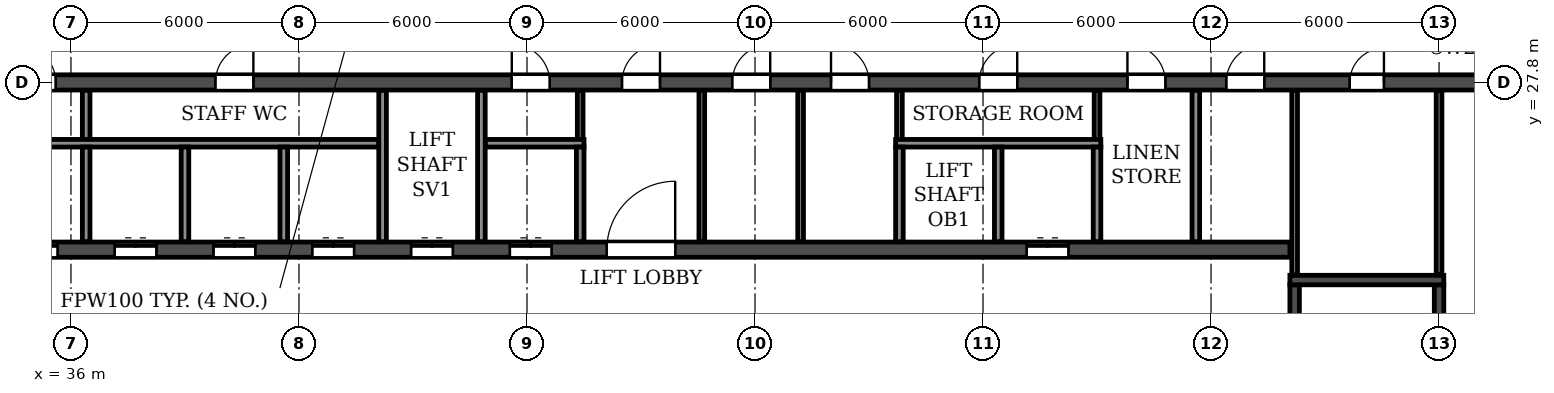
"""IFC4 building model, lengths in metres.
Left out: names, types, materials, properties, quantities, classifications, styles, units other than length and angle.
Written with IfcOpenShell. Run it as: python <this file> out.ifc"""

import sys

from ifc_helpers import new_model, si_unit, direction, frame, frame_2d, origin, place, context, subcontext, project, spatial, rectangle, extrude, element, fill, save


model = new_model("IFC4")
c1 = context("Model", 3, precision=1e-05, world=origin(), true_north=direction((0.0, 1.0)))
c2 = subcontext(c1, "Body", "Model", "MODEL_VIEW")
j1 = project(units=[si_unit("LENGTHUNIT", "METRE"), si_unit("PLANEANGLEUNIT", "RADIAN")], contexts=[c1])
p1 = place(None, origin())
s1 = spatial("IfcSite", under=j1, at=p1, CompositionType="ELEMENT")
p2 = place(p1, origin())
s2 = spatial("IfcBuilding", under=s1, at=p2, CompositionType="ELEMENT")
p3 = place(p2, frame((0.0, 0.0, 191.7)))
s3 = spatial("IfcBuildingStorey", under=s2, at=p3, CompositionType="ELEMENT", Elevation=191.7)
p4 = place(p3, frame((18.2, 27.8, 0.0), z_axis=(0.0, 0.0, 1.0), x_axis=(1.0, 0.0, 0.0)))
e1 = element("IfcWall", 1, at=p4, inside=s3, PredefinedType="SOLIDWALL", context=c2, shape_type="SweptSolid", body=[
    extrude(rectangle(XDim=65.6, YDim=0.4, at=frame_2d((32.8, 0.0))), origin(), (0.0, 0.0, 1.0), 3.08),
])
p5 = place(p4, frame((0.7, 0.0, 0.0)))
e2 = element("IfcOpeningElement", 2, at=p5, cuts=e1, PredefinedType="OPENING", context=c2, shape_type="SweptSolid", body=[
    extrude(rectangle(XDim=1.0, YDim=2.1, at=frame_2d((0.5, 1.05))), frame((0.0, 0.21, 0.0), z_axis=(0.0, -1.0, 0.0), x_axis=(1.0, 0.0, 0.0)), (0.0, 0.0, 1.0), 0.42),
])
p6 = place(p4, frame((4.05, 0.0, 0.0)))
e3 = element("IfcOpeningElement", 3, at=p6, cuts=e1, PredefinedType="OPENING", context=c2, shape_type="SweptSolid", body=[
    extrude(rectangle(XDim=0.9, YDim=2.1, at=frame_2d((0.45, 1.05))), frame((0.0, 0.21, 0.0), z_axis=(0.0, -1.0, 0.0), x_axis=(1.0, 0.0, 0.0)), (0.0, 0.0, 1.0), 0.42),
])
p7 = place(p4, frame((13.25, 0.0, 0.0)))
e4 = element("IfcOpeningElement", 4, at=p7, cuts=e1, PredefinedType="OPENING", context=c2, shape_type="SweptSolid", body=[
    extrude(rectangle(XDim=0.9, YDim=2.1, at=frame_2d((0.45, 1.05))), frame((0.0, 0.21, 0.0), z_axis=(0.0, -1.0, 0.0), x_axis=(1.0, 0.0, 0.0)), (0.0, 0.0, 1.0), 0.42),
])
p8 = place(p4, frame((16.4, 0.0, 0.0)))
e5 = element("IfcOpeningElement", 5, at=p8, cuts=e1, PredefinedType="OPENING", context=c2, shape_type="SweptSolid", body=[
    extrude(rectangle(XDim=1.0, YDim=2.1, at=frame_2d((0.5, 1.05))), frame((0.0, 0.21, 0.0), z_axis=(0.0, -1.0, 0.0), x_axis=(1.0, 0.0, 0.0)), (0.0, 0.0, 1.0), 0.42),
])
p9 = place(p4, frame((21.6, 0.0, 0.0)))
e6 = element("IfcOpeningElement", 6, at=p9, cuts=e1, PredefinedType="OPENING", context=c2, shape_type="SweptSolid", body=[
    extrude(rectangle(XDim=1.0, YDim=2.1, at=frame_2d((0.5, 1.05))), frame((0.0, 0.21, 0.0), z_axis=(0.0, -1.0, 0.0), x_axis=(1.0, 0.0, 0.0)), (0.0, 0.0, 1.0), 0.42),
])
p10 = place(p4, frame((29.4, 0.0, 0.0)))
e7 = element("IfcOpeningElement", 7, at=p10, cuts=e1, PredefinedType="OPENING", context=c2, shape_type="SweptSolid", body=[
    extrude(rectangle(XDim=1.0, YDim=2.1, at=frame_2d((0.5, 1.05))), frame((0.0, 0.21, 0.0), z_axis=(0.0, -1.0, 0.0), x_axis=(1.0, 0.0, 0.0)), (0.0, 0.0, 1.0), 0.42),
])
p11 = place(p4, frame((32.3, 0.0, 0.0)))
e8 = element("IfcOpeningElement", 8, at=p11, cuts=e1, PredefinedType="OPENING", context=c2, shape_type="SweptSolid", body=[
    extrude(rectangle(XDim=1.0, YDim=2.1, at=frame_2d((0.5, 1.05))), frame((0.0, 0.21, 0.0), z_axis=(0.0, -1.0, 0.0), x_axis=(1.0, 0.0, 0.0)), (0.0, 0.0, 1.0), 0.42),
])
p12 = place(p4, frame((35.2, 0.0, 0.0)))
e9 = element("IfcOpeningElement", 9, at=p12, cuts=e1, PredefinedType="OPENING", context=c2, shape_type="SweptSolid", body=[
    extrude(rectangle(XDim=1.0, YDim=2.1, at=frame_2d((0.5, 1.05))), frame((0.0, 0.21, 0.0), z_axis=(0.0, -1.0, 0.0), x_axis=(1.0, 0.0, 0.0)), (0.0, 0.0, 1.0), 0.42),
])
p13 = place(p4, frame((37.8, 0.0, 0.0)))
e10 = element("IfcOpeningElement", 10, at=p13, cuts=e1, PredefinedType="OPENING", context=c2, shape_type="SweptSolid", body=[
    extrude(rectangle(XDim=1.0, YDim=2.1, at=frame_2d((0.5, 1.05))), frame((0.0, 0.21, 0.0), z_axis=(0.0, -1.0, 0.0), x_axis=(1.0, 0.0, 0.0)), (0.0, 0.0, 1.0), 0.42),
])
p14 = place(p4, frame((41.7, 0.0, 0.0)))
e11 = element("IfcOpeningElement", 11, at=p14, cuts=e1, PredefinedType="OPENING", context=c2, shape_type="SweptSolid", body=[
    extrude(rectangle(XDim=1.0, YDim=2.1, at=frame_2d((0.5, 1.05))), frame((0.0, 0.21, 0.0), z_axis=(0.0, -1.0, 0.0), x_axis=(1.0, 0.0, 0.0)), (0.0, 0.0, 1.0), 0.42),
])
p15 = place(p4, frame((45.6, 0.0, 0.0)))
e12 = element("IfcOpeningElement", 12, at=p15, cuts=e1, PredefinedType="OPENING", context=c2, shape_type="SweptSolid", body=[
    extrude(rectangle(XDim=1.0, YDim=2.1, at=frame_2d((0.5, 1.05))), frame((0.0, 0.21, 0.0), z_axis=(0.0, -1.0, 0.0), x_axis=(1.0, 0.0, 0.0)), (0.0, 0.0, 1.0), 0.42),
])
p16 = place(p4, frame((48.2, 0.0, 0.0)))
e13 = element("IfcOpeningElement", 13, at=p16, cuts=e1, PredefinedType="OPENING", context=c2, shape_type="SweptSolid", body=[
    extrude(rectangle(XDim=1.0, YDim=2.1, at=frame_2d((0.5, 1.05))), frame((0.0, 0.21, 0.0), z_axis=(0.0, -1.0, 0.0), x_axis=(1.0, 0.0, 0.0)), (0.0, 0.0, 1.0), 0.42),
])
p17 = place(p4, frame((51.45, 0.0, 0.0)))
e14 = element("IfcOpeningElement", 14, at=p17, cuts=e1, PredefinedType="OPENING", context=c2, shape_type="SweptSolid", body=[
    extrude(rectangle(XDim=0.9, YDim=2.1, at=frame_2d((0.45, 1.05))), frame((0.0, 0.21, 0.0), z_axis=(0.0, -1.0, 0.0), x_axis=(1.0, 0.0, 0.0)), (0.0, 0.0, 1.0), 0.42),
])
p18 = place(p4, frame((60.65, 0.0, 0.0)))
e15 = element("IfcOpeningElement", 15, at=p18, cuts=e1, PredefinedType="OPENING", context=c2, shape_type="SweptSolid", body=[
    extrude(rectangle(XDim=0.9, YDim=2.1, at=frame_2d((0.45, 1.05))), frame((0.0, 0.21, 0.0), z_axis=(0.0, -1.0, 0.0), x_axis=(1.0, 0.0, 0.0)), (0.0, 0.0, 1.0), 0.42),
])
p19 = place(p4, frame((63.9, 0.0, 0.0)))
e16 = element("IfcOpeningElement", 16, at=p19, cuts=e1, PredefinedType="OPENING", context=c2, shape_type="SweptSolid", body=[
    extrude(rectangle(XDim=1.0, YDim=2.1, at=frame_2d((0.5, 1.05))), frame((0.0, 0.21, 0.0), z_axis=(0.0, -1.0, 0.0), x_axis=(1.0, 0.0, 0.0)), (0.0, 0.0, 1.0), 0.42),
])
p20 = place(p3, frame((33.925, 23.4, 0.0), z_axis=(0.0, 0.0, 1.0), x_axis=(1.0, 0.0, 0.0)))
e17 = element("IfcWall", 17, at=p20, inside=s3, PredefinedType="SOLIDWALL", context=c2, shape_type="SweptSolid", body=[
    extrude(rectangle(XDim=34.15, YDim=0.4, at=frame_2d((17.075, 0.0))), origin(), (0.0, 0.0, 1.0), 3.08),
])
p21 = place(p20, frame((16.175, 0.0, 0.0)))
e18 = element("IfcOpeningElement", 18, at=p21, cuts=e17, PredefinedType="OPENING", context=c2, shape_type="SweptSolid", body=[
    extrude(rectangle(XDim=1.8, YDim=2.1, at=frame_2d((0.9, 1.05))), frame((0.0, 0.21, 0.0), z_axis=(0.0, -1.0, 0.0), x_axis=(1.0, 0.0, 0.0)), (0.0, 0.0, 1.0), 0.42),
])
p22 = place(p20, frame((0.625, 0.0, 0.0)))
e19 = element("IfcOpeningElement", 19, at=p22, cuts=e17, PredefinedType="OPENING", context=c2, shape_type="SweptSolid", body=[
    extrude(rectangle(XDim=1.1, YDim=2.1, at=frame_2d((0.55, 1.05))), frame((0.0, 0.21, 0.0), z_axis=(0.0, -1.0, 0.0), x_axis=(1.0, 0.0, 0.0)), (0.0, 0.0, 1.0), 0.42),
])
p23 = place(p20, frame((3.225, 0.0, 0.0)))
e20 = element("IfcOpeningElement", 20, at=p23, cuts=e17, PredefinedType="OPENING", context=c2, shape_type="SweptSolid", body=[
    extrude(rectangle(XDim=1.1, YDim=2.1, at=frame_2d((0.55, 1.05))), frame((0.0, 0.21, 0.0), z_axis=(0.0, -1.0, 0.0), x_axis=(1.0, 0.0, 0.0)), (0.0, 0.0, 1.0), 0.42),
])
p24 = place(p20, frame((5.825, 0.0, 0.0)))
e21 = element("IfcOpeningElement", 21, at=p24, cuts=e17, PredefinedType="OPENING", context=c2, shape_type="SweptSolid", body=[
    extrude(rectangle(XDim=1.1, YDim=2.1, at=frame_2d((0.55, 1.05))), frame((0.0, 0.21, 0.0), z_axis=(0.0, -1.0, 0.0), x_axis=(1.0, 0.0, 0.0)), (0.0, 0.0, 1.0), 0.42),
])
p25 = place(p20, frame((8.425, 0.0, 0.0)))
e22 = element("IfcOpeningElement", 22, at=p25, cuts=e17, PredefinedType="OPENING", context=c2, shape_type="SweptSolid", body=[
    extrude(rectangle(XDim=1.1, YDim=2.1, at=frame_2d((0.55, 1.05))), frame((0.0, 0.21, 0.0), z_axis=(0.0, -1.0, 0.0), x_axis=(1.0, 0.0, 0.0)), (0.0, 0.0, 1.0), 0.42),
])
p26 = place(p20, frame((11.025, 0.0, 0.0)))
e23 = element("IfcOpeningElement", 23, at=p26, cuts=e17, PredefinedType="OPENING", context=c2, shape_type="SweptSolid", body=[
    extrude(rectangle(XDim=1.1, YDim=2.1, at=frame_2d((0.55, 1.05))), frame((0.0, 0.21, 0.0), z_axis=(0.0, -1.0, 0.0), x_axis=(1.0, 0.0, 0.0)), (0.0, 0.0, 1.0), 0.42),
])
p27 = place(p20, frame((13.625, 0.0, 0.0)))
e24 = element("IfcOpeningElement", 24, at=p27, cuts=e17, PredefinedType="OPENING", context=c2, shape_type="SweptSolid", body=[
    extrude(rectangle(XDim=1.1, YDim=2.1, at=frame_2d((0.55, 1.05))), frame((0.0, 0.21, 0.0), z_axis=(0.0, -1.0, 0.0), x_axis=(1.0, 0.0, 0.0)), (0.0, 0.0, 1.0), 0.42),
])
p28 = place(p20, frame((27.225, 0.0, 0.0)))
e25 = element("IfcOpeningElement", 25, at=p28, cuts=e17, PredefinedType="OPENING", context=c2, shape_type="SweptSolid", body=[
    extrude(rectangle(XDim=1.1, YDim=2.1, at=frame_2d((0.55, 1.05))), frame((0.0, 0.21, 0.0), z_axis=(0.0, -1.0, 0.0), x_axis=(1.0, 0.0, 0.0)), (0.0, 0.0, 1.0), 0.42),
])
p29 = place(p3, frame((68.2, 14.8, 0.0), z_axis=(0.0, 0.0, 1.0), x_axis=(0.0, 1.0, 0.0)))
e26 = element("IfcWall", 26, at=p29, inside=s3, PredefinedType="SOLIDWALL", context=c2, shape_type="SweptSolid", body=[
    extrude(rectangle(XDim=7.675, YDim=0.25, at=frame_2d((3.837, 0.0))), origin(), (0.0, 0.0, 1.0), 3.08),
])
p30 = place(p29, frame((0.5, 0.0, 0.0)))
e27 = element("IfcOpeningElement", 27, at=p30, cuts=e26, PredefinedType="OPENING", context=c2, shape_type="SweptSolid", body=[
    extrude(rectangle(XDim=1.0, YDim=2.1, at=frame_2d((0.5, 1.05))), frame((0.0, 0.135, 0.0), z_axis=(0.0, -1.0, 0.0), x_axis=(1.0, 0.0, 0.0)), (0.0, 0.0, 1.0), 0.27),
])
p31 = place(p3, frame((72.0, 14.8, 0.0), z_axis=(0.0, 0.0, 1.0), x_axis=(0.0, 1.0, 0.0)))
e28 = element("IfcWall", 28, at=p31, inside=s3, PredefinedType="SOLIDWALL", context=c2, shape_type="SweptSolid", body=[
    extrude(rectangle(XDim=7.675, YDim=0.25, at=frame_2d((3.837, 0.0))), origin(), (0.0, 0.0, 1.0), 3.08),
])
p32 = place(p3, frame((68.075, 22.6, 0.0), z_axis=(0.0, 0.0, 1.0), x_axis=(1.0, 0.0, 0.0)))
e29 = element("IfcWall", 29, at=p32, inside=s3, PredefinedType="SOLIDWALL", context=c2, shape_type="SweptSolid", body=[
    extrude(rectangle(XDim=4.05, YDim=0.25, at=frame_2d((2.025, 0.0))), origin(), (0.0, 0.0, 1.0), 3.08),
])
p33 = place(p3, frame((49.4, 26.3, 0.0), z_axis=(0.0, 0.0, 1.0), x_axis=(0.0, 1.0, 0.0)))
e30 = element("IfcWall", 30, at=p33, inside=s3, PredefinedType="PARTITIONING", context=c2, shape_type="SweptSolid", body=[
    extrude(rectangle(XDim=1.29, YDim=0.15, at=frame_2d((0.645, 0.0))), origin(), (0.0, 0.0, 1.0), 3.08),
])
for number, where, z_axis, x_axis in (
    (31, (52.6, 23.61, 0.0), (0.0, 0.0, 1.0), (0.0, 1.0, 0.0)),
    (32, (55.2, 23.61, 0.0), (0.0, 0.0, 1.0), (0.0, 1.0, 0.0)),
):
    element("IfcWall", number, at=place(p3, frame(where, z_axis=z_axis, x_axis=x_axis)), inside=s3, PredefinedType="PARTITIONING", context=c2, shape_type="SweptSolid", body=[
        extrude(rectangle(XDim=3.98, YDim=0.15, at=frame_2d((1.99, 0.0))), origin(), (0.0, 0.0, 1.0), 3.08),
    ])
for number, where, z_axis, x_axis in (
    (33, (57.8, 26.3, 0.0), (0.0, 0.0, 1.0), (0.0, 1.0, 0.0)),
    (34, (63.0, 26.3, 0.0), (0.0, 0.0, 1.0), (0.0, 1.0, 0.0)),
):
    element("IfcWall", number, at=place(p3, frame(where, z_axis=z_axis, x_axis=x_axis)), inside=s3, PredefinedType="PARTITIONING", context=c2, shape_type="SweptSolid", body=[
        extrude(rectangle(XDim=1.29, YDim=0.15, at=frame_2d((0.645, 0.0))), origin(), (0.0, 0.0, 1.0), 3.08),
    ])
p34 = place(p3, frame((36.4, 26.3, 0.0), z_axis=(0.0, 0.0, 1.0), x_axis=(0.0, 1.0, 0.0)))
e35 = element("IfcWall", 35, at=p34, inside=s3, PredefinedType="PARTITIONING", context=c2, shape_type="SweptSolid", body=[
    extrude(rectangle(XDim=1.29, YDim=0.2, at=frame_2d((0.645, 0.0))), origin(), (0.0, 0.0, 1.0), 3.08),
])
p35 = place(p3, frame((65.6, 23.61, 0.0), z_axis=(0.0, 0.0, 1.0), x_axis=(0.0, 1.0, 0.0)))
e36 = element("IfcWall", 36, at=p35, inside=s3, PredefinedType="PARTITIONING", context=c2, shape_type="SweptSolid", body=[
    extrude(rectangle(XDim=3.98, YDim=0.2, at=frame_2d((1.99, 0.0))), origin(), (0.0, 0.0, 1.0), 3.08),
])
for number, where, z_axis, x_axis in (
    (37, (68.2, 22.735, 0.0), (0.0, 0.0, 1.0), (0.0, 1.0, 0.0)),
    (38, (72.0, 22.735, 0.0), (0.0, 0.0, 1.0), (0.0, 1.0, 0.0)),
):
    element("IfcWall", number, at=place(p3, frame(where, z_axis=z_axis, x_axis=x_axis)), inside=s3, PredefinedType="PARTITIONING", context=c2, shape_type="SweptSolid", body=[
        extrude(rectangle(XDim=4.855, YDim=0.15, at=frame_2d((2.427, 0.0))), origin(), (0.0, 0.0, 1.0), 3.08),
    ])
p36 = place(p3, frame((33.7, 26.2, 0.0), z_axis=(0.0, 0.0, 1.0), x_axis=(1.0, 0.0, 0.0)))
e39 = element("IfcWall", 39, at=p36, inside=s3, PredefinedType="PARTITIONING", context=c2, shape_type="SweptSolid", body=[
    extrude(rectangle(XDim=10.4, YDim=0.2, at=frame_2d((5.2, 0.0))), origin(), (0.0, 0.0, 1.0), 3.08),
])
p37 = place(p3, frame((46.9, 26.2, 0.0), z_axis=(0.0, 0.0, 1.0), x_axis=(1.0, 0.0, 0.0)))
e40 = element("IfcWall", 40, at=p37, inside=s3, PredefinedType="PARTITIONING", context=c2, shape_type="SweptSolid", body=[
    extrude(rectangle(XDim=2.6, YDim=0.2, at=frame_2d((1.3, 0.0))), origin(), (0.0, 0.0, 1.0), 3.08),
])
p38 = place(p3, frame((57.7, 26.2, 0.0), z_axis=(0.0, 0.0, 1.0), x_axis=(1.0, 0.0, 0.0)))
e41 = element("IfcWall", 41, at=p38, inside=s3, PredefinedType="PARTITIONING", context=c2, shape_type="SweptSolid", body=[
    extrude(rectangle(XDim=5.4, YDim=0.2, at=frame_2d((2.7, 0.0))), origin(), (0.0, 0.0, 1.0), 3.08),
])
for number, where, z_axis, x_axis in (
    (42, (36.4, 23.61, 0.0), (0.0, 0.0, 1.0), (0.0, 1.0, 0.0)),
    (43, (39.0, 23.61, 0.0), (0.0, 0.0, 1.0), (0.0, 1.0, 0.0)),
    (44, (41.6, 23.61, 0.0), (0.0, 0.0, 1.0), (0.0, 1.0, 0.0)),
):
    element("IfcWall", number, at=place(p3, frame(where, z_axis=z_axis, x_axis=x_axis)), inside=s3, PredefinedType="PARTITIONING", context=c2, shape_type="SweptSolid", body=[
        extrude(rectangle(XDim=2.49, YDim=0.2, at=frame_2d((1.245, 0.0))), origin(), (0.0, 0.0, 1.0), 3.08),
    ])
for number, where, z_axis, x_axis in (
    (45, (44.2, 23.61, 0.0), (0.0, 0.0, 1.0), (0.0, 1.0, 0.0)),
    (46, (46.8, 23.61, 0.0), (0.0, 0.0, 1.0), (0.0, 1.0, 0.0)),
):
    element("IfcWall", number, at=place(p3, frame(where, z_axis=z_axis, x_axis=x_axis)), inside=s3, PredefinedType="PARTITIONING", context=c2, shape_type="SweptSolid", body=[
        extrude(rectangle(XDim=3.98, YDim=0.2, at=frame_2d((1.99, 0.0))), origin(), (0.0, 0.0, 1.0), 3.08),
    ])
for number, where, z_axis, x_axis in (
    (47, (49.4, 23.61, 0.0), (0.0, 0.0, 1.0), (0.0, 1.0, 0.0)),
    (48, (57.8, 23.61, 0.0), (0.0, 0.0, 1.0), (0.0, 1.0, 0.0)),
    (49, (60.4, 23.61, 0.0), (0.0, 0.0, 1.0), (0.0, 1.0, 0.0)),
    (50, (63.0, 23.61, 0.0), (0.0, 0.0, 1.0), (0.0, 1.0, 0.0)),
):
    element("IfcWall", number, at=place(p3, frame(where, z_axis=z_axis, x_axis=x_axis)), inside=s3, PredefinedType="PARTITIONING", context=c2, shape_type="SweptSolid", body=[
        extrude(rectangle(XDim=2.49, YDim=0.2, at=frame_2d((1.245, 0.0))), origin(), (0.0, 0.0, 1.0), 3.08),
    ])
p39 = place(p8, origin())
e51 = element("IfcDoor", 51, at=p39, inside=s3, OperationType="SINGLE_SWING_LEFT", PredefinedType="DOOR", context=c2, shape_type="SweptSolid", body=[
    extrude(rectangle(XDim=1.0, YDim=2.1, at=frame_2d((0.5, 1.05))), frame((0.0, 0.025, 0.0), z_axis=(0.0, -1.0, 0.0), x_axis=(1.0, 0.0, 0.0)), (0.0, 0.0, 1.0), 0.05),
])
fill(e5, e51)
p40 = place(p9, origin())
e52 = element("IfcDoor", 52, at=p40, inside=s3, OperationType="SINGLE_SWING_RIGHT", PredefinedType="DOOR", context=c2, shape_type="SweptSolid", body=[
    extrude(rectangle(XDim=1.0, YDim=2.1, at=frame_2d((0.5, 1.05))), frame((0.0, 0.025, 0.0), z_axis=(0.0, -1.0, 0.0), x_axis=(1.0, 0.0, 0.0)), (0.0, 0.0, 1.0), 0.05),
])
fill(e6, e52)
p41 = place(p10, origin())
e53 = element("IfcDoor", 53, at=p41, inside=s3, OperationType="SINGLE_SWING_LEFT", PredefinedType="DOOR", context=c2, shape_type="SweptSolid", body=[
    extrude(rectangle(XDim=1.0, YDim=2.1, at=frame_2d((0.5, 1.05))), frame((0.0, 0.025, 0.0), z_axis=(0.0, -1.0, 0.0), x_axis=(1.0, 0.0, 0.0)), (0.0, 0.0, 1.0), 0.05),
])
fill(e7, e53)
p42 = place(p11, origin())
e54 = element("IfcDoor", 54, at=p42, inside=s3, OperationType="SINGLE_SWING_RIGHT", PredefinedType="DOOR", context=c2, shape_type="SweptSolid", body=[
    extrude(rectangle(XDim=1.0, YDim=2.1, at=frame_2d((0.5, 1.05))), frame((0.0, 0.025, 0.0), z_axis=(0.0, -1.0, 0.0), x_axis=(1.0, 0.0, 0.0)), (0.0, 0.0, 1.0), 0.05),
])
fill(e8, e54)
p43 = place(p12, origin())
e55 = element("IfcDoor", 55, at=p43, inside=s3, OperationType="SINGLE_SWING_RIGHT", PredefinedType="DOOR", context=c2, shape_type="SweptSolid", body=[
    extrude(rectangle(XDim=1.0, YDim=2.1, at=frame_2d((0.5, 1.05))), frame((0.0, 0.025, 0.0), z_axis=(0.0, -1.0, 0.0), x_axis=(1.0, 0.0, 0.0)), (0.0, 0.0, 1.0), 0.05),
])
fill(e9, e55)
p44 = place(p13, origin())
e56 = element("IfcDoor", 56, at=p44, inside=s3, OperationType="SINGLE_SWING_LEFT", PredefinedType="DOOR", context=c2, shape_type="SweptSolid", body=[
    extrude(rectangle(XDim=1.0, YDim=2.1, at=frame_2d((0.5, 1.05))), frame((0.0, 0.025, 0.0), z_axis=(0.0, -1.0, 0.0), x_axis=(1.0, 0.0, 0.0)), (0.0, 0.0, 1.0), 0.05),
])
fill(e10, e56)
p45 = place(p14, origin())
e57 = element("IfcDoor", 57, at=p45, inside=s3, OperationType="SINGLE_SWING_RIGHT", PredefinedType="DOOR", context=c2, shape_type="SweptSolid", body=[
    extrude(rectangle(XDim=1.0, YDim=2.1, at=frame_2d((0.5, 1.05))), frame((0.0, 0.025, 0.0), z_axis=(0.0, -1.0, 0.0), x_axis=(1.0, 0.0, 0.0)), (0.0, 0.0, 1.0), 0.05),
])
fill(e11, e57)
p46 = place(p15, origin())
e58 = element("IfcDoor", 58, at=p46, inside=s3, OperationType="SINGLE_SWING_LEFT", PredefinedType="DOOR", context=c2, shape_type="SweptSolid", body=[
    extrude(rectangle(XDim=1.0, YDim=2.1, at=frame_2d((0.5, 1.05))), frame((0.0, 0.025, 0.0), z_axis=(0.0, -1.0, 0.0), x_axis=(1.0, 0.0, 0.0)), (0.0, 0.0, 1.0), 0.05),
])
fill(e12, e58)
p47 = place(p16, origin())
e59 = element("IfcDoor", 59, at=p47, inside=s3, OperationType="SINGLE_SWING_RIGHT", PredefinedType="DOOR", context=c2, shape_type="SweptSolid", body=[
    extrude(rectangle(XDim=1.0, YDim=2.1, at=frame_2d((0.5, 1.05))), frame((0.0, 0.025, 0.0), z_axis=(0.0, -1.0, 0.0), x_axis=(1.0, 0.0, 0.0)), (0.0, 0.0, 1.0), 0.05),
])
fill(e13, e59)
p48 = place(p17, origin())
e60 = element("IfcDoor", 60, at=p48, inside=s3, OperationType="SINGLE_SWING_RIGHT", PredefinedType="DOOR", context=c2, shape_type="SweptSolid", body=[
    extrude(rectangle(XDim=0.9, YDim=2.1, at=frame_2d((0.45, 1.05))), frame((0.0, 0.025, 0.0), z_axis=(0.0, -1.0, 0.0), x_axis=(1.0, 0.0, 0.0)), (0.0, 0.0, 1.0), 0.05),
])
fill(e14, e60)
p49 = place(p21, origin())
e61 = element("IfcDoor", 61, at=p49, inside=s3, OperationType="DOUBLE_DOOR_SINGLE_SWING", PredefinedType="DOOR", context=c2, shape_type="SweptSolid", body=[
    extrude(rectangle(XDim=1.8, YDim=2.1, at=frame_2d((0.9, 1.05))), frame((0.0, 0.025, 0.0), z_axis=(0.0, -1.0, 0.0), x_axis=(1.0, 0.0, 0.0)), (0.0, 0.0, 1.0), 0.05),
])
fill(e18, e61)
p50 = place(p22, origin())
e62 = element("IfcDoor", 62, at=p50, inside=s3, OperationType="DOUBLE_DOOR_SLIDING", PredefinedType="DOOR", context=c2, shape_type="SweptSolid", body=[
    extrude(rectangle(XDim=1.1, YDim=2.1, at=frame_2d((0.55, 1.05))), frame((0.0, 0.025, 0.0), z_axis=(0.0, -1.0, 0.0), x_axis=(1.0, 0.0, 0.0)), (0.0, 0.0, 1.0), 0.05),
])
fill(e19, e62)
p51 = place(p23, origin())
e63 = element("IfcDoor", 63, at=p51, inside=s3, OperationType="DOUBLE_DOOR_SLIDING", PredefinedType="DOOR", context=c2, shape_type="SweptSolid", body=[
    extrude(rectangle(XDim=1.1, YDim=2.1, at=frame_2d((0.55, 1.05))), frame((0.0, 0.025, 0.0), z_axis=(0.0, -1.0, 0.0), x_axis=(1.0, 0.0, 0.0)), (0.0, 0.0, 1.0), 0.05),
])
fill(e20, e63)
p52 = place(p24, origin())
e64 = element("IfcDoor", 64, at=p52, inside=s3, OperationType="DOUBLE_DOOR_SLIDING", PredefinedType="DOOR", context=c2, shape_type="SweptSolid", body=[
    extrude(rectangle(XDim=1.1, YDim=2.1, at=frame_2d((0.55, 1.05))), frame((0.0, 0.025, 0.0), z_axis=(0.0, -1.0, 0.0), x_axis=(1.0, 0.0, 0.0)), (0.0, 0.0, 1.0), 0.05),
])
fill(e21, e64)
p53 = place(p25, origin())
e65 = element("IfcDoor", 65, at=p53, inside=s3, OperationType="DOUBLE_DOOR_SLIDING", PredefinedType="DOOR", context=c2, shape_type="SweptSolid", body=[
    extrude(rectangle(XDim=1.1, YDim=2.1, at=frame_2d((0.55, 1.05))), frame((0.0, 0.025, 0.0), z_axis=(0.0, -1.0, 0.0), x_axis=(1.0, 0.0, 0.0)), (0.0, 0.0, 1.0), 0.05),
])
fill(e22, e65)
p54 = place(p26, origin())
e66 = element("IfcDoor", 66, at=p54, inside=s3, OperationType="DOUBLE_DOOR_SLIDING", PredefinedType="DOOR", context=c2, shape_type="SweptSolid", body=[
    extrude(rectangle(XDim=1.1, YDim=2.1, at=frame_2d((0.55, 1.05))), frame((0.0, 0.025, 0.0), z_axis=(0.0, -1.0, 0.0), x_axis=(1.0, 0.0, 0.0)), (0.0, 0.0, 1.0), 0.05),
])
fill(e23, e66)
p55 = place(p27, origin())
e67 = element("IfcDoor", 67, at=p55, inside=s3, OperationType="DOUBLE_DOOR_SLIDING", PredefinedType="DOOR", context=c2, shape_type="SweptSolid", body=[
    extrude(rectangle(XDim=1.1, YDim=2.1, at=frame_2d((0.55, 1.05))), frame((0.0, 0.025, 0.0), z_axis=(0.0, -1.0, 0.0), x_axis=(1.0, 0.0, 0.0)), (0.0, 0.0, 1.0), 0.05),
])
fill(e24, e67)
p56 = place(p28, origin())
e68 = element("IfcDoor", 68, at=p56, inside=s3, OperationType="DOUBLE_DOOR_SLIDING", PredefinedType="DOOR", context=c2, shape_type="SweptSolid", body=[
    extrude(rectangle(XDim=1.1, YDim=2.1, at=frame_2d((0.55, 1.05))), frame((0.0, 0.025, 0.0), z_axis=(0.0, -1.0, 0.0), x_axis=(1.0, 0.0, 0.0)), (0.0, 0.0, 1.0), 0.05),
])
fill(e25, e68)
save(model, sys.argv[1])
